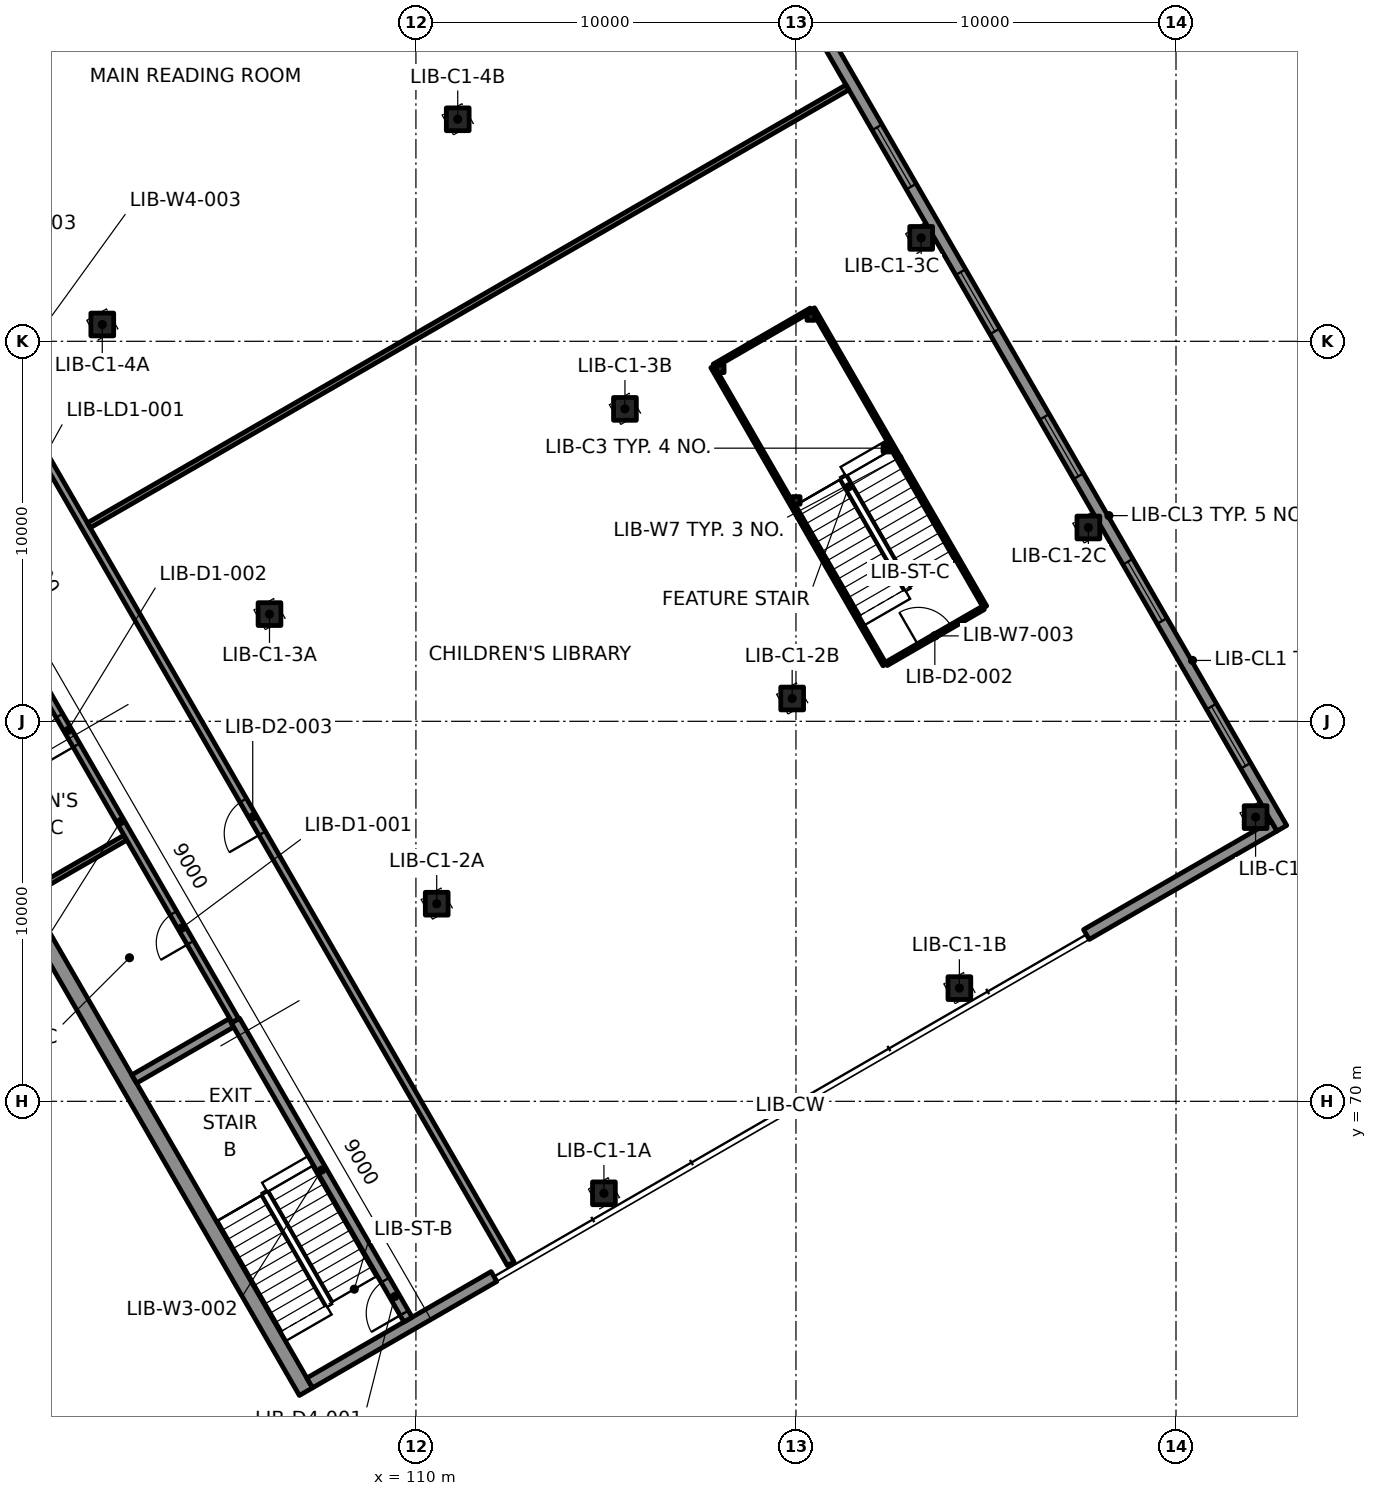
"""IFC4 building model, lengths in metres.
Left out: names, types, materials, properties, quantities, classifications, styles, units other than length and angle.
Written with IfcOpenShell. Run it as: python <this file> out.ifc"""

import sys

from ifc_helpers import new_model, si_unit, direction, frame, frame_2d, origin, origin_2d, place, context, subcontext, project, spatial, rectangle, extrude, element, fill, save


model = new_model("IFC4")
c1 = context("Model", 3, precision=1e-05, world=origin(), true_north=direction((0.0, 1.0)))
c2 = subcontext(c1, "Body", "Model", "MODEL_VIEW")
j1 = project(units=[si_unit("LENGTHUNIT", "METRE"), si_unit("PLANEANGLEUNIT", "RADIAN")], contexts=[c1])
p1 = place(None, origin())
s1 = spatial("IfcSite", under=j1, at=p1, CompositionType="ELEMENT")
p2 = place(p1, origin())
s2 = spatial("IfcBuilding", under=s1, at=p2, CompositionType="ELEMENT")
p3 = place(p2, frame((0.0, 0.0, 8.0)))
s3 = spatial("IfcBuildingStorey", under=s2, at=p3, CompositionType="ELEMENT", Elevation=8.0)
p4 = place(p3, frame((101.821, 68.315, -0.0), z_axis=(0.0, 0.0, 1.0), x_axis=(-0.5, 0.866025403784, 0.0)))
e1 = element("IfcColumn", 1, at=p4, inside=s3, PredefinedType="COLUMN", context=c2, shape_type="SweptSolid", body=[
    extrude(rectangle(XDim=1.2, YDim=1.5, at=origin_2d()), origin(), (0.0, 0.0, 1.0), 4.601),
])
p5 = place(p3, frame((101.471, 67.42, 0.0), z_axis=(0.0, 0.0, 1.0), x_axis=(0.866028621479, 0.499994426748, 0.0)))
e2 = element("IfcWall", 2, at=p5, inside=s3, PredefinedType="PARTITIONING", context=c2, shape_type="SweptSolid", body=[
    extrude(rectangle(XDim=1.709, YDim=0.1, at=frame_2d((0.855, 0.0))), origin(), (0.0, 0.0, 1.0), 3.7),
])
p6 = place(p3, frame((95.201, 64.493, 0.0), z_axis=(0.0, 0.0, 1.0), x_axis=(0.866031059472, 0.499990203933, 0.0)))
e3 = element("IfcWall", 3, at=p6, inside=s3, PredefinedType="PARTITIONING", context=c2, shape_type="SweptSolid", body=[
    extrude(rectangle(XDim=6.893, YDim=0.1, at=frame_2d((3.447, 0.0))), origin(), (0.0, 0.0, 1.0), 3.7),
])
p7 = place(p3, frame((101.446, 67.464, 0.0), z_axis=(0.0, 0.0, 1.0), x_axis=(-0.500033033937, 0.866006330792, 0.0)))
e4 = element("IfcWall", 4, at=p7, inside=s3, PredefinedType="PARTITIONING", context=c2, shape_type="SweptSolid", body=[
    extrude(rectangle(XDim=0.499, YDim=0.1, at=frame_2d((0.25, 0.0))), origin(), (0.0, 0.0, 1.0), 3.7),
])
p8 = place(p3, frame((91.575, 66.47, 0.0), z_axis=(0.0, 0.0, 1.0), x_axis=(0.866027754727, -0.499995928025, 0.0)))
e5 = element("IfcWall", 5, at=p8, inside=s3, PredefinedType="PARTITIONING", context=c2, shape_type="SweptSolid", body=[
    extrude(rectangle(XDim=13.214, YDim=0.15, at=frame_2d((6.607, 0.0))), origin(), (0.0, 0.0, 1.0), 3.7),
])
p9 = place(p8, frame((8.091, 0.0, 0.0)))
e6 = element("IfcOpeningElement", 6, at=p9, cuts=e5, PredefinedType="OPENING", context=c2, shape_type="SweptSolid", body=[
    extrude(rectangle(XDim=0.9, YDim=2.1, at=frame_2d((0.45, 1.05))), frame((0.0, 0.085, 0.0), z_axis=(0.0, -1.0, 0.0), x_axis=(1.0, 0.0, 0.0)), (0.0, 0.0, 1.0), 0.17),
])
for number, where, z_axis, x_axis in (
    (7, (114.947, 67.579, -0.36), (0.0, 0.0, 1.0), (1.0, 0.0, 0.0)),
    (8, (124.3, 72.979, -0.36), (0.0, 0.0, 1.0), (1.0, 0.0, 0.0)),
    (9, (132.094, 77.479, -0.36), (0.0, 0.0, 1.0), (1.0, 0.0, 0.0)),
    (10, (110.547, 75.2, -0.36), (0.0, 0.0, 1.0), (1.0, 0.0, 0.0)),
    (11, (119.9, 80.6, -0.36), (0.0, 0.0, 1.0), (1.0, 0.0, 0.0)),
    (12, (127.694, 85.1, -0.36), (0.0, 0.0, 1.0), (1.0, 0.0, 0.0)),
    (13, (106.147, 82.821, -0.36), (0.0, 0.0, 1.0), (1.0, 0.0, 0.0)),
    (14, (115.5, 88.221, -0.36), (0.0, 0.0, 1.0), (1.0, 0.0, 0.0)),
    (15, (123.294, 92.721, -0.36), (0.0, 0.0, 1.0), (1.0, 0.0, 0.0)),
    (16, (101.747, 90.442, -0.36), (0.0, 0.0, 1.0), (1.0, 0.0, 0.0)),
    (17, (111.1, 95.842, -0.36), (0.0, 0.0, 1.0), (1.0, 0.0, 0.0)),
):
    element("IfcColumn", number, at=place(p3, frame(where, z_axis=z_axis, x_axis=x_axis)), inside=s3, PredefinedType="COLUMN", context=c2, shape_type="SweptSolid", body=[
        extrude(rectangle(XDim=0.6, YDim=0.6, at=origin_2d()), origin(), (0.0, 0.0, 1.0), 4.6),
    ])
for number, where, z_axis, x_axis in (
    (18, (122.39, 87.188, -4.0), (0.0, 0.0, 1.0), (1.0, 0.0, 0.0)),
    (19, (120.008, 85.813, -4.0), (0.0, 0.0, 1.0), (1.0, 0.0, 0.0)),
    (20, (120.39, 90.652, -4.0), (0.0, 0.0, 1.0), (1.0, 0.0, 0.0)),
    (21, (118.008, 89.277, -4.0), (0.0, 0.0, 1.0), (1.0, 0.0, 0.0)),
):
    element("IfcColumn", number, at=place(p3, frame(where, z_axis=z_axis, x_axis=x_axis)), inside=s3, PredefinedType="COLUMN", context=c2, shape_type="SweptSolid", body=[
        extrude(rectangle(XDim=0.2, YDim=0.2, at=origin_2d()), origin(), (0.0, 0.0, 1.0), 6.1),
    ])
p10 = place(p3, frame((107.106, 62.36, 0.0), z_axis=(0.0, 0.0, 1.0), x_axis=(-0.49999992739, 0.866025445706, 0.0)))
e22 = element("IfcWall", 22, at=p10, inside=s3, PredefinedType="SOLIDWALL", context=c2, shape_type="SweptSolid", body=[
    extrude(rectangle(XDim=54.0, YDim=0.4, at=frame_2d((27.0, 0.0))), origin(), (0.0, 0.0, 1.0), 4.24),
])
p11 = place(p3, frame((132.784, 77.185, 0.0), z_axis=(0.0, 0.0, 1.0), x_axis=(-0.49999992739, 0.866025445706, 0.0)))
e23 = element("IfcWall", 23, at=p11, inside=s3, PredefinedType="SOLIDWALL", context=c2, shape_type="SweptSolid", body=[
    extrude(rectangle(XDim=54.0, YDim=0.3, at=frame_2d((27.0, 0.0))), origin(), (0.0, 0.0, 1.0), 4.24),
])
p12 = place(p11, frame((1.9, 0.0, 0.9)))
e24 = element("IfcOpeningElement", 24, at=p12, cuts=e23, PredefinedType="OPENING", context=c2, shape_type="SweptSolid", body=[
    extrude(rectangle(XDim=1.8, YDim=2.4, at=frame_2d((0.9, 1.2))), frame((0.0, 0.16, 0.0), z_axis=(0.0, -1.0, 0.0), x_axis=(1.0, 0.0, 0.0)), (0.0, 0.0, 1.0), 0.32),
])
p13 = place(p11, frame((6.3, 0.0, 0.9)))
e25 = element("IfcOpeningElement", 25, at=p13, cuts=e23, PredefinedType="OPENING", context=c2, shape_type="SweptSolid", body=[
    extrude(rectangle(XDim=1.8, YDim=2.4, at=frame_2d((0.9, 1.2))), frame((0.0, 0.16, 0.0), z_axis=(0.0, -1.0, 0.0), x_axis=(1.0, 0.0, 0.0)), (0.0, 0.0, 1.0), 0.32),
])
p14 = place(p11, frame((10.7, 0.0, 0.9)))
e26 = element("IfcOpeningElement", 26, at=p14, cuts=e23, PredefinedType="OPENING", context=c2, shape_type="SweptSolid", body=[
    extrude(rectangle(XDim=1.8, YDim=2.4, at=frame_2d((0.9, 1.2))), frame((0.0, 0.16, 0.0), z_axis=(0.0, -1.0, 0.0), x_axis=(1.0, 0.0, 0.0)), (0.0, 0.0, 1.0), 0.32),
])
p15 = place(p11, frame((15.1, 0.0, 0.9)))
e27 = element("IfcOpeningElement", 27, at=p15, cuts=e23, PredefinedType="OPENING", context=c2, shape_type="SweptSolid", body=[
    extrude(rectangle(XDim=1.8, YDim=2.4, at=frame_2d((0.9, 1.2))), frame((0.0, 0.16, 0.0), z_axis=(0.0, -1.0, 0.0), x_axis=(1.0, 0.0, 0.0)), (0.0, 0.0, 1.0), 0.32),
])
p16 = place(p11, frame((19.5, 0.0, 0.9)))
e28 = element("IfcOpeningElement", 28, at=p16, cuts=e23, PredefinedType="OPENING", context=c2, shape_type="SweptSolid", body=[
    extrude(rectangle(XDim=1.8, YDim=2.4, at=frame_2d((0.9, 1.2))), frame((0.0, 0.16, 0.0), z_axis=(0.0, -1.0, 0.0), x_axis=(1.0, 0.0, 0.0)), (0.0, 0.0, 1.0), 0.32),
])
p17 = place(p11, frame((23.9, 0.0, 0.9)))
e29 = element("IfcOpeningElement", 29, at=p17, cuts=e23, PredefinedType="OPENING", context=c2, shape_type="SweptSolid", body=[
    extrude(rectangle(XDim=1.8, YDim=2.4, at=frame_2d((0.9, 1.2))), frame((0.0, 0.16, 0.0), z_axis=(0.0, -1.0, 0.0), x_axis=(1.0, 0.0, 0.0)), (0.0, 0.0, 1.0), 0.32),
])
p18 = place(p11, frame((28.3, 0.0, 0.9)))
e30 = element("IfcOpeningElement", 30, at=p18, cuts=e23, PredefinedType="OPENING", context=c2, shape_type="SweptSolid", body=[
    extrude(rectangle(XDim=1.8, YDim=2.4, at=frame_2d((0.9, 1.2))), frame((0.0, 0.16, 0.0), z_axis=(0.0, -1.0, 0.0), x_axis=(1.0, 0.0, 0.0)), (0.0, 0.0, 1.0), 0.32),
])
p19 = place(p11, frame((32.7, 0.0, 0.9)))
e31 = element("IfcOpeningElement", 31, at=p19, cuts=e23, PredefinedType="OPENING", context=c2, shape_type="SweptSolid", body=[
    extrude(rectangle(XDim=1.8, YDim=2.4, at=frame_2d((0.9, 1.2))), frame((0.0, 0.16, 0.0), z_axis=(0.0, -1.0, 0.0), x_axis=(1.0, 0.0, 0.0)), (0.0, 0.0, 1.0), 0.32),
])
p20 = place(p11, frame((37.1, 0.0, 0.9)))
e32 = element("IfcOpeningElement", 32, at=p20, cuts=e23, PredefinedType="OPENING", context=c2, shape_type="SweptSolid", body=[
    extrude(rectangle(XDim=1.8, YDim=2.4, at=frame_2d((0.9, 1.2))), frame((0.0, 0.16, 0.0), z_axis=(0.0, -1.0, 0.0), x_axis=(1.0, 0.0, 0.0)), (0.0, 0.0, 1.0), 0.32),
])
p21 = place(p11, frame((41.5, 0.0, 0.9)))
e33 = element("IfcOpeningElement", 33, at=p21, cuts=e23, PredefinedType="OPENING", context=c2, shape_type="SweptSolid", body=[
    extrude(rectangle(XDim=1.8, YDim=2.4, at=frame_2d((0.9, 1.2))), frame((0.0, 0.16, 0.0), z_axis=(0.0, -1.0, 0.0), x_axis=(1.0, 0.0, 0.0)), (0.0, 0.0, 1.0), 0.32),
])
p22 = place(p11, frame((45.9, 0.0, 0.9)))
e34 = element("IfcOpeningElement", 34, at=p22, cuts=e23, PredefinedType="OPENING", context=c2, shape_type="SweptSolid", body=[
    extrude(rectangle(XDim=1.8, YDim=2.4, at=frame_2d((0.9, 1.2))), frame((0.0, 0.16, 0.0), z_axis=(0.0, -1.0, 0.0), x_axis=(1.0, 0.0, 0.0)), (0.0, 0.0, 1.0), 0.32),
])
p23 = place(p11, frame((50.3, 0.0, 0.9)))
e35 = element("IfcOpeningElement", 35, at=p23, cuts=e23, PredefinedType="OPENING", context=c2, shape_type="SweptSolid", body=[
    extrude(rectangle(XDim=1.8, YDim=2.4, at=frame_2d((0.9, 1.2))), frame((0.0, 0.16, 0.0), z_axis=(0.0, -1.0, 0.0), x_axis=(1.0, 0.0, 0.0)), (0.0, 0.0, 1.0), 0.32),
])
p24 = place(p3, frame((107.204, 62.59, 0.0), z_axis=(0.0, 0.0, 1.0), x_axis=(0.866045472092, 0.499965239061, 0.0)))
e36 = element("IfcWall", 36, at=p24, inside=s3, PredefinedType="SOLIDWALL", context=c2, shape_type="SweptSolid", body=[
    extrude(rectangle(XDim=5.6, YDim=0.3, at=frame_2d((2.8, 0.0))), origin(), (0.0, 0.0, 1.0), 4.24),
])
p25 = place(p3, frame((127.643, 74.389, 0.0), z_axis=(0.0, 0.0, 1.0), x_axis=(0.866025820012, 0.499999279071, 0.0)))
e37 = element("IfcWall", 37, at=p25, inside=s3, PredefinedType="SOLIDWALL", context=c2, shape_type="SweptSolid", body=[
    extrude(rectangle(XDim=5.7, YDim=0.3, at=frame_2d((2.85, 0.0))), origin(), (0.0, 0.0, 1.0), 4.24),
])
p26 = place(p3, frame((102.587, 70.587, 0.0), z_axis=(0.0, 0.0, 1.0), x_axis=(0.866039495442, 0.49997559174, 0.0)))
e38 = element("IfcWall", 38, at=p26, inside=s3, PredefinedType="SOLIDWALL", context=c2, shape_type="SweptSolid", body=[
    extrude(rectangle(XDim=2.95, YDim=0.25, at=frame_2d((1.475, 0.0))), origin(), (0.0, 0.0, 1.0), 4.24),
])
p27 = place(p3, frame((109.792, 64.257, 0.0), z_axis=(0.0, 0.0, 1.0), x_axis=(-0.499994616197, 0.866028512102, 0.0)))
e39 = element("IfcWall", 39, at=p27, inside=s3, PredefinedType="SOLIDWALL", context=c2, shape_type="SweptSolid", body=[
    extrude(rectangle(XDim=9.085, YDim=0.25, at=frame_2d((4.542, 0.0))), origin(), (0.0, 0.0, 1.0), 4.24),
])
p28 = place(p27, frame((0.2, 0.0, 0.0)))
e40 = element("IfcOpeningElement", 40, at=p28, cuts=e39, PredefinedType="OPENING", context=c2, shape_type="SweptSolid", body=[
    extrude(rectangle(XDim=1.0, YDim=2.1, at=frame_2d((0.5, 1.05))), frame((0.0, 0.135, 0.0), z_axis=(0.0, -1.0, 0.0), x_axis=(1.0, 0.0, 0.0)), (0.0, 0.0, 1.0), 0.27),
])
p29 = place(p3, frame((99.779, 75.45, 0.0), z_axis=(0.0, 0.0, 1.0), x_axis=(0.866017493347, 0.500013701029, 0.0)))
e41 = element("IfcWall", 41, at=p29, inside=s3, PredefinedType="PARTITIONING", context=c2, shape_type="SweptSolid", body=[
    extrude(rectangle(XDim=2.975, YDim=0.15, at=frame_2d((1.488, 0.0))), origin(), (0.0, 0.0, 1.0), 4.24),
])
p30 = place(p3, frame((105.25, 72.125, 0.0), z_axis=(0.0, 0.0, 1.0), x_axis=(-0.499996309931, 0.866027534236, 0.0)))
e42 = element("IfcWall", 42, at=p30, inside=s3, PredefinedType="PARTITIONING", context=c2, shape_type="SweptSolid", body=[
    extrude(rectangle(XDim=12.09, YDim=0.2, at=frame_2d((6.045, 0.0))), origin(), (0.0, 0.0, 1.0), 4.24),
])
p31 = place(p30, frame((2.365, 0.0, 0.0)))
e43 = element("IfcOpeningElement", 43, at=p31, cuts=e42, PredefinedType="OPENING", context=c2, shape_type="SweptSolid", body=[
    extrude(rectangle(XDim=0.9, YDim=2.1, at=frame_2d((0.45, 1.05))), frame((0.0, 0.11, 0.0), z_axis=(0.0, -1.0, 0.0), x_axis=(1.0, 0.0, 0.0)), (0.0, 0.0, 1.0), 0.22),
])
p32 = place(p30, frame((8.365, 0.0, 0.0)))
e44 = element("IfcOpeningElement", 44, at=p32, cuts=e42, PredefinedType="OPENING", context=c2, shape_type="SweptSolid", body=[
    extrude(rectangle(XDim=0.9, YDim=2.1, at=frame_2d((0.45, 1.05))), frame((0.0, 0.11, 0.0), z_axis=(0.0, -1.0, 0.0), x_axis=(1.0, 0.0, 0.0)), (0.0, 0.0, 1.0), 0.22),
])
p33 = place(p3, frame((112.496, 65.725, 0.0), z_axis=(0.0, 0.0, 1.0), x_axis=(-0.499998673217, 0.866026169802, 0.0)))
e45 = element("IfcWall", 45, at=p33, inside=s3, PredefinedType="PARTITIONING", context=c2, shape_type="SweptSolid", body=[
    extrude(rectangle(XDim=53.48, YDim=0.2, at=frame_2d((26.74, 0.0))), origin(), (0.0, 0.0, 1.0), 4.24),
])
p34 = place(p33, frame((13.08, 0.0, 0.0)))
e46 = element("IfcOpeningElement", 46, at=p34, cuts=e45, PredefinedType="OPENING", context=c2, shape_type="SweptSolid", body=[
    extrude(rectangle(XDim=1.0, YDim=2.1, at=frame_2d((0.5, 1.05))), frame((0.0, 0.11, 0.0), z_axis=(0.0, -1.0, 0.0), x_axis=(1.0, 0.0, 0.0)), (0.0, 0.0, 1.0), 0.22),
])
p35 = place(p33, frame((25.88, 0.0, 0.0)))
e47 = element("IfcOpeningElement", 47, at=p35, cuts=e45, PredefinedType="OPENING", context=c2, shape_type="SweptSolid", body=[
    extrude(rectangle(XDim=1.8, YDim=2.1, at=frame_2d((0.9, 1.05))), frame((0.0, 0.11, 0.0), z_axis=(0.0, -1.0, 0.0), x_axis=(1.0, 0.0, 0.0)), (0.0, 0.0, 1.0), 0.22),
])
p36 = place(p33, frame((50.58, 0.0, 0.0)))
e48 = element("IfcOpeningElement", 48, at=p36, cuts=e45, PredefinedType="OPENING", context=c2, shape_type="SweptSolid", body=[
    extrude(rectangle(XDim=1.0, YDim=2.1, at=frame_2d((0.5, 1.05))), frame((0.0, 0.11, 0.0), z_axis=(0.0, -1.0, 0.0), x_axis=(1.0, 0.0, 0.0)), (0.0, 0.0, 1.0), 0.22),
])
p37 = place(p33, frame((44.28, 0.0, 0.0)))
e49 = element("IfcOpeningElement", 49, at=p37, cuts=e45, PredefinedType="OPENING", context=c2, shape_type="SweptSolid", body=[
    extrude(rectangle(XDim=1.0, YDim=2.1, at=frame_2d((0.5, 1.05))), frame((0.0, 0.11, 0.0), z_axis=(0.0, -1.0, 0.0), x_axis=(1.0, 0.0, 0.0)), (0.0, 0.0, 1.0), 0.22),
])
p38 = place(p3, frame((101.392, 85.157, 0.0), z_axis=(0.0, 0.0, 1.0), x_axis=(0.866022961126, 0.500004230785, 0.0)))
e50 = element("IfcWall", 50, at=p38, inside=s3, PredefinedType="PARTITIONING", context=c2, shape_type="SweptSolid", body=[
    extrude(rectangle(XDim=23.05, YDim=0.15, at=frame_2d((11.525, 0.0))), origin(), (0.0, 0.0, 1.0), 4.24),
])
for number, where, z_axis, x_axis in (
    (51, (122.333, 81.486, 0.0), (0.0, 0.0, 1.0), (-0.5, 0.866, 0.0)),
    (52, (124.975, 83.01, 0.0), (0.0, 0.0, 1.0), (-0.5, 0.866, 0.0)),
):
    element("IfcWall", number, at=place(p3, frame(where, z_axis=z_axis, x_axis=x_axis)), inside=s3, PredefinedType="PARTITIONING", context=c2, shape_type="SweptSolid", body=[
        extrude(rectangle(XDim=9.06, YDim=0.1, at=frame_2d((4.53, 0.0))), origin(), (0.0, 0.0, 1.0), 4.24),
    ])
p39 = place(p3, frame((122.377, 81.51, 0.0), z_axis=(0.0, 0.0, 1.0), x_axis=(0.866003658127, 0.500037662692, 0.0)))
e53 = element("IfcWall", 53, at=p39, inside=s3, PredefinedType="PARTITIONING", context=c2, shape_type="SweptSolid", body=[
    extrude(rectangle(XDim=2.95, YDim=0.1, at=frame_2d((1.475, 0.0))), origin(), (0.0, 0.0, 1.0), 4.24),
])
p40 = place(p39, frame((0.975, 0.0, 0.0)))
e54 = element("IfcOpeningElement", 54, at=p40, cuts=e53, PredefinedType="OPENING", context=c2, shape_type="SweptSolid", body=[
    extrude(rectangle(XDim=1.0, YDim=2.1, at=frame_2d((0.5, 1.05))), frame((0.0, 0.06, 0.0), z_axis=(0.0, -1.0, 0.0), x_axis=(1.0, 0.0, 0.0)), (0.0, 0.0, 1.0), 0.12),
])
p41 = place(p3, frame((117.847, 89.357, 0.0), z_axis=(0.0, 0.0, 1.0), x_axis=(0.866003658127, 0.500037662692, 0.0)))
e55 = element("IfcWall", 55, at=p41, inside=s3, PredefinedType="PARTITIONING", context=c2, shape_type="SweptSolid", body=[
    extrude(rectangle(XDim=2.95, YDim=0.1, at=frame_2d((1.475, 0.0))), origin(), (0.0, 0.0, 1.0), 4.24),
])
p42 = place(p12, origin())
e56 = element("IfcWindow", 56, at=p42, inside=s3, PartitioningType="SINGLE_PANEL", PredefinedType="WINDOW", context=c2, shape_type="SweptSolid", body=[
    extrude(rectangle(XDim=1.8, YDim=2.4, at=frame_2d((0.9, 1.2))), frame((0.0, 0.03, 0.0), z_axis=(0.0, -1.0, 0.0), x_axis=(1.0, 0.0, 0.0)), (0.0, 0.0, 1.0), 0.06),
])
fill(e24, e56)
p43 = place(p13, origin())
e57 = element("IfcWindow", 57, at=p43, inside=s3, PartitioningType="SINGLE_PANEL", PredefinedType="WINDOW", context=c2, shape_type="SweptSolid", body=[
    extrude(rectangle(XDim=1.8, YDim=2.4, at=frame_2d((0.9, 1.2))), frame((0.0, 0.03, 0.0), z_axis=(0.0, -1.0, 0.0), x_axis=(1.0, 0.0, 0.0)), (0.0, 0.0, 1.0), 0.06),
])
fill(e25, e57)
p44 = place(p14, origin())
e58 = element("IfcWindow", 58, at=p44, inside=s3, PartitioningType="SINGLE_PANEL", PredefinedType="WINDOW", context=c2, shape_type="SweptSolid", body=[
    extrude(rectangle(XDim=1.8, YDim=2.4, at=frame_2d((0.9, 1.2))), frame((0.0, 0.03, 0.0), z_axis=(0.0, -1.0, 0.0), x_axis=(1.0, 0.0, 0.0)), (0.0, 0.0, 1.0), 0.06),
])
fill(e26, e58)
p45 = place(p15, origin())
e59 = element("IfcWindow", 59, at=p45, inside=s3, PartitioningType="SINGLE_PANEL", PredefinedType="WINDOW", context=c2, shape_type="SweptSolid", body=[
    extrude(rectangle(XDim=1.8, YDim=2.4, at=frame_2d((0.9, 1.2))), frame((0.0, 0.03, 0.0), z_axis=(0.0, -1.0, 0.0), x_axis=(1.0, 0.0, 0.0)), (0.0, 0.0, 1.0), 0.06),
])
fill(e27, e59)
p46 = place(p16, origin())
e60 = element("IfcWindow", 60, at=p46, inside=s3, PartitioningType="SINGLE_PANEL", PredefinedType="WINDOW", context=c2, shape_type="SweptSolid", body=[
    extrude(rectangle(XDim=1.8, YDim=2.4, at=frame_2d((0.9, 1.2))), frame((0.0, 0.03, 0.0), z_axis=(0.0, -1.0, 0.0), x_axis=(1.0, 0.0, 0.0)), (0.0, 0.0, 1.0), 0.06),
])
fill(e28, e60)
p47 = place(p28, origin())
e61 = element("IfcDoor", 61, at=p47, inside=s3, OperationType="SINGLE_SWING_LEFT", PredefinedType="DOOR", context=c2, shape_type="SweptSolid", body=[
    extrude(rectangle(XDim=1.0, YDim=2.1, at=frame_2d((0.5, 1.05))), frame((0.0, 0.025, 0.0), z_axis=(0.0, -1.0, 0.0), x_axis=(1.0, 0.0, 0.0)), (0.0, 0.0, 1.0), 0.05),
])
fill(e40, e61)
p48 = place(p31, origin())
e62 = element("IfcDoor", 62, at=p48, inside=s3, OperationType="SINGLE_SWING_LEFT", PredefinedType="DOOR", context=c2, shape_type="SweptSolid", body=[
    extrude(rectangle(XDim=0.9, YDim=2.1, at=frame_2d((0.45, 1.05))), frame((0.0, 0.025, 0.0), z_axis=(0.0, -1.0, 0.0), x_axis=(1.0, 0.0, 0.0)), (0.0, 0.0, 1.0), 0.05),
])
fill(e43, e62)
p49 = place(p32, origin())
e63 = element("IfcDoor", 63, at=p49, inside=s3, OperationType="SINGLE_SWING_RIGHT", PredefinedType="DOOR", context=c2, shape_type="SweptSolid", body=[
    extrude(rectangle(XDim=0.9, YDim=2.1, at=frame_2d((0.45, 1.05))), frame((0.0, 0.025, 0.0), z_axis=(0.0, -1.0, 0.0), x_axis=(1.0, 0.0, 0.0)), (0.0, 0.0, 1.0), 0.05),
])
fill(e44, e63)
p50 = place(p40, origin())
e64 = element("IfcDoor", 64, at=p50, inside=s3, OperationType="SINGLE_SWING_RIGHT", PredefinedType="DOOR", context=c2, shape_type="SweptSolid", body=[
    extrude(rectangle(XDim=1.0, YDim=2.1, at=frame_2d((0.5, 1.05))), frame((0.0, 0.025, 0.0), z_axis=(0.0, -1.0, 0.0), x_axis=(1.0, 0.0, 0.0)), (0.0, 0.0, 1.0), 0.05),
])
fill(e54, e64)
p51 = place(p34, origin())
e65 = element("IfcDoor", 65, at=p51, inside=s3, OperationType="SINGLE_SWING_LEFT", PredefinedType="DOOR", context=c2, shape_type="SweptSolid", body=[
    extrude(rectangle(XDim=1.0, YDim=2.1, at=frame_2d((0.5, 1.05))), frame((0.0, 0.025, 0.0), z_axis=(0.0, -1.0, 0.0), x_axis=(1.0, 0.0, 0.0)), (0.0, 0.0, 1.0), 0.05),
])
fill(e46, e65)
save(model, sys.argv[1])
